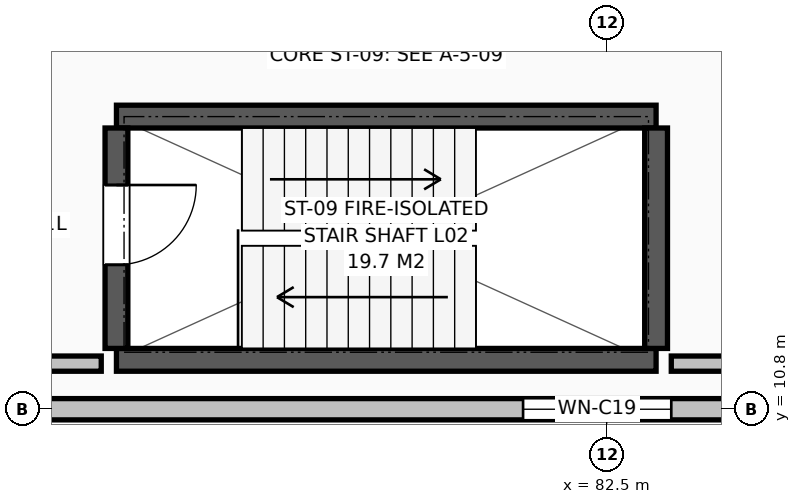
"""IFC4 building model, lengths in metres.
Left out: names, types, materials, properties, quantities, classifications, styles, units other than length and angle.
Written with IfcOpenShell. Run it as: python <this file> out.ifc"""

import sys

from ifc_helpers import new_model, si_unit, direction, frame, frame_2d, origin, place, context, subcontext, project, spatial, rectangle, extrude, element, fill, save


model = new_model("IFC4")
c1 = context("Model", 3, precision=1e-05, world=origin(), true_north=direction((0.0, 1.0)))
c2 = subcontext(c1, "Body", "Model", "MODEL_VIEW")
j1 = project(units=[si_unit("LENGTHUNIT", "METRE"), si_unit("PLANEANGLEUNIT", "RADIAN")], contexts=[c1])
p1 = place(None, origin())
s1 = spatial("IfcSite", under=j1, at=p1, CompositionType="ELEMENT")
p2 = place(p1, origin())
s2 = spatial("IfcBuilding", under=s1, at=p2, CompositionType="ELEMENT")
p3 = place(p2, frame((0.0, 0.0, 9.0)))
s3 = spatial("IfcBuildingStorey", under=s2, at=p3, CompositionType="ELEMENT", Elevation=9.0)
p4 = place(p3, frame((0.0, 10.8, 0.0), z_axis=(0.0, 0.0, 1.0), x_axis=(1.0, 0.0, 0.0)))
e1 = element("IfcWall", 1, at=p4, inside=s3, PredefinedType="SOLIDWALL", context=c2, shape_type="SweptSolid", body=[
    extrude(rectangle(XDim=93.6, YDim=0.28, at=frame_2d((46.8, 0.0))), origin(), (0.0, 0.0, 1.0), 3.058),
])
p5 = place(p4, frame((2.2, 0.0, 0.78)))
e2 = element("IfcOpeningElement", 2, at=p5, cuts=e1, PredefinedType="OPENING", context=c2, shape_type="SweptSolid", body=[
    extrude(rectangle(XDim=1.25, YDim=1.7, at=frame_2d((0.625, 0.85))), frame((0.0, 0.15, 0.0), z_axis=(0.0, -1.0, 0.0), x_axis=(1.0, 0.0, 0.0)), (0.0, 0.0, 1.0), 0.3),
])
p6 = place(p4, frame((9.4, 0.0, 0.78)))
e3 = element("IfcOpeningElement", 3, at=p6, cuts=e1, PredefinedType="OPENING", context=c2, shape_type="SweptSolid", body=[
    extrude(rectangle(XDim=1.35, YDim=1.75, at=frame_2d((0.675, 0.875))), frame((0.0, 0.15, 0.0), z_axis=(0.0, -1.0, 0.0), x_axis=(1.0, 0.0, 0.0)), (0.0, 0.0, 1.0), 0.3),
])
p7 = place(p4, frame((16.6, 0.0, 0.78)))
e4 = element("IfcOpeningElement", 4, at=p7, cuts=e1, PredefinedType="OPENING", context=c2, shape_type="SweptSolid", body=[
    extrude(rectangle(XDim=1.5, YDim=1.75, at=frame_2d((0.75, 0.875))), frame((0.0, 0.15, 0.0), z_axis=(0.0, -1.0, 0.0), x_axis=(1.0, 0.0, 0.0)), (0.0, 0.0, 1.0), 0.3),
])
p8 = place(p4, frame((23.8, 0.0, 0.78)))
e5 = element("IfcOpeningElement", 5, at=p8, cuts=e1, PredefinedType="OPENING", context=c2, shape_type="SweptSolid", body=[
    extrude(rectangle(XDim=1.65, YDim=1.8, at=frame_2d((0.825, 0.9))), frame((0.0, 0.15, 0.0), z_axis=(0.0, -1.0, 0.0), x_axis=(1.0, 0.0, 0.0)), (0.0, 0.0, 1.0), 0.3),
])
p9 = place(p4, frame((31.0, 0.0, 0.78)))
e6 = element("IfcOpeningElement", 6, at=p9, cuts=e1, PredefinedType="OPENING", context=c2, shape_type="SweptSolid", body=[
    extrude(rectangle(XDim=1.95, YDim=1.8, at=frame_2d((0.975, 0.9))), frame((0.0, 0.15, 0.0), z_axis=(0.0, -1.0, 0.0), x_axis=(1.0, 0.0, 0.0)), (0.0, 0.0, 1.0), 0.3),
])
p10 = place(p4, frame((38.2, 0.0, 0.78)))
e7 = element("IfcOpeningElement", 7, at=p10, cuts=e1, PredefinedType="OPENING", context=c2, shape_type="SweptSolid", body=[
    extrude(rectangle(XDim=2.1, YDim=1.8, at=frame_2d((1.05, 0.9))), frame((0.0, 0.15, 0.0), z_axis=(0.0, -1.0, 0.0), x_axis=(1.0, 0.0, 0.0)), (0.0, 0.0, 1.0), 0.3),
])
p11 = place(p4, frame((52.6, 0.0, 0.78)))
e8 = element("IfcOpeningElement", 8, at=p11, cuts=e1, PredefinedType="OPENING", context=c2, shape_type="SweptSolid", body=[
    extrude(rectangle(XDim=1.25, YDim=1.7, at=frame_2d((0.625, 0.85))), frame((0.0, 0.15, 0.0), z_axis=(0.0, -1.0, 0.0), x_axis=(1.0, 0.0, 0.0)), (0.0, 0.0, 1.0), 0.3),
])
p12 = place(p4, frame((67.0, 0.0, 0.78)))
e9 = element("IfcOpeningElement", 9, at=p12, cuts=e1, PredefinedType="OPENING", context=c2, shape_type="SweptSolid", body=[
    extrude(rectangle(XDim=1.5, YDim=1.75, at=frame_2d((0.75, 0.875))), frame((0.0, 0.15, 0.0), z_axis=(0.0, -1.0, 0.0), x_axis=(1.0, 0.0, 0.0)), (0.0, 0.0, 1.0), 0.3),
])
p13 = place(p4, frame((81.4, 0.0, 0.78)))
e10 = element("IfcOpeningElement", 10, at=p13, cuts=e1, PredefinedType="OPENING", context=c2, shape_type="SweptSolid", body=[
    extrude(rectangle(XDim=1.95, YDim=1.8, at=frame_2d((0.975, 0.9))), frame((0.0, 0.15, 0.0), z_axis=(0.0, -1.0, 0.0), x_axis=(1.0, 0.0, 0.0)), (0.0, 0.0, 1.0), 0.3),
])
for number, where, z_axis, x_axis in (
    (11, (76.05, 11.45, 0.0), (0.0, 0.0, 1.0), (1.0, 0.0, 0.0)),
    (12, (83.15, 14.65, 0.0), (0.0, 0.0, 1.0), (-1.0, 0.0, 0.0)),
):
    element("IfcWall", number, at=place(p3, frame(where, z_axis=z_axis, x_axis=x_axis)), inside=s3, PredefinedType="SHEAR", context=c2, shape_type="SweptSolid", body=[
        extrude(rectangle(XDim=7.1, YDim=0.3, at=frame_2d((3.55, 0.0))), origin(), (0.0, 0.0, 1.0), 3.45),
    ])
p14 = place(p3, frame((83.15, 11.6, 0.0), z_axis=(0.0, 0.0, 1.0), x_axis=(0.0, 1.0, 0.0)))
e13 = element("IfcWall", 13, at=p14, inside=s3, PredefinedType="SHEAR", context=c2, shape_type="SweptSolid", body=[
    extrude(rectangle(XDim=2.9, YDim=0.3, at=frame_2d((1.45, 0.0))), origin(), (0.0, 0.0, 1.0), 3.45),
])
p15 = place(p3, frame((76.05, 14.5, 0.0), z_axis=(0.0, 0.0, 1.0), x_axis=(0.0, -1.0, 0.0)))
e14 = element("IfcWall", 14, at=p15, inside=s3, PredefinedType="SHEAR", context=c2, shape_type="SweptSolid", body=[
    extrude(rectangle(XDim=2.9, YDim=0.3, at=frame_2d((1.45, 0.0))), origin(), (0.0, 0.0, 1.0), 3.45),
])
p16 = place(p15, frame((0.75, 0.0, 0.0)))
e15 = element("IfcOpeningElement", 15, at=p16, cuts=e14, PredefinedType="OPENING", context=c2, shape_type="SweptSolid", body=[
    extrude(rectangle(XDim=1.05, YDim=2.15, at=frame_2d((0.525, 1.075))), frame((0.0, 0.16, 0.0), z_axis=(0.0, -1.0, 0.0), x_axis=(1.0, 0.0, 0.0)), (0.0, 0.0, 1.0), 0.32),
])
p17 = place(p3, frame((92.6, 11.4, 0.0), z_axis=(0.0, 0.0, 1.0), x_axis=(-1.0, 0.0, 0.0)))
e16 = element("IfcWall", 16, at=p17, inside=s3, PredefinedType="SOLIDWALL", context=c2, shape_type="SweptSolid", body=[
    extrude(rectangle(XDim=9.25, YDim=0.2, at=frame_2d((4.625, 0.0))), origin(), (0.0, 0.0, 1.0), 3.6),
])
p18 = place(p3, frame((75.85, 11.4, 0.0), z_axis=(0.0, 0.0, 1.0), x_axis=(-1.0, 0.0, 0.0)))
e17 = element("IfcWall", 17, at=p18, inside=s3, PredefinedType="SOLIDWALL", context=c2, shape_type="SweptSolid", body=[
    extrude(rectangle(XDim=7.65, YDim=0.2, at=frame_2d((3.825, 0.0))), origin(), (0.0, 0.0, 1.0), 3.185),
])
p19 = place(p13, origin())
e18 = element("IfcWindow", 18, at=p19, inside=s3, PartitioningType="SINGLE_PANEL", PredefinedType="WINDOW", context=c2, shape_type="SweptSolid", body=[
    extrude(rectangle(XDim=1.95, YDim=1.8, at=frame_2d((0.975, 0.9))), frame((0.0, 0.03, 0.0), z_axis=(0.0, -1.0, 0.0), x_axis=(1.0, 0.0, 0.0)), (0.0, 0.0, 1.0), 0.06),
])
fill(e10, e18)
p20 = place(p16, origin())
e19 = element("IfcDoor", 19, at=p20, inside=s3, OperationType="SINGLE_SWING_LEFT", PredefinedType="DOOR", context=c2, shape_type="SweptSolid", body=[
    extrude(rectangle(XDim=1.05, YDim=2.15, at=frame_2d((0.525, 1.075))), frame((0.0, 0.025, 0.0), z_axis=(0.0, -1.0, 0.0), x_axis=(1.0, 0.0, 0.0)), (0.0, 0.0, 1.0), 0.05),
])
fill(e15, e19)
save(model, sys.argv[1])
